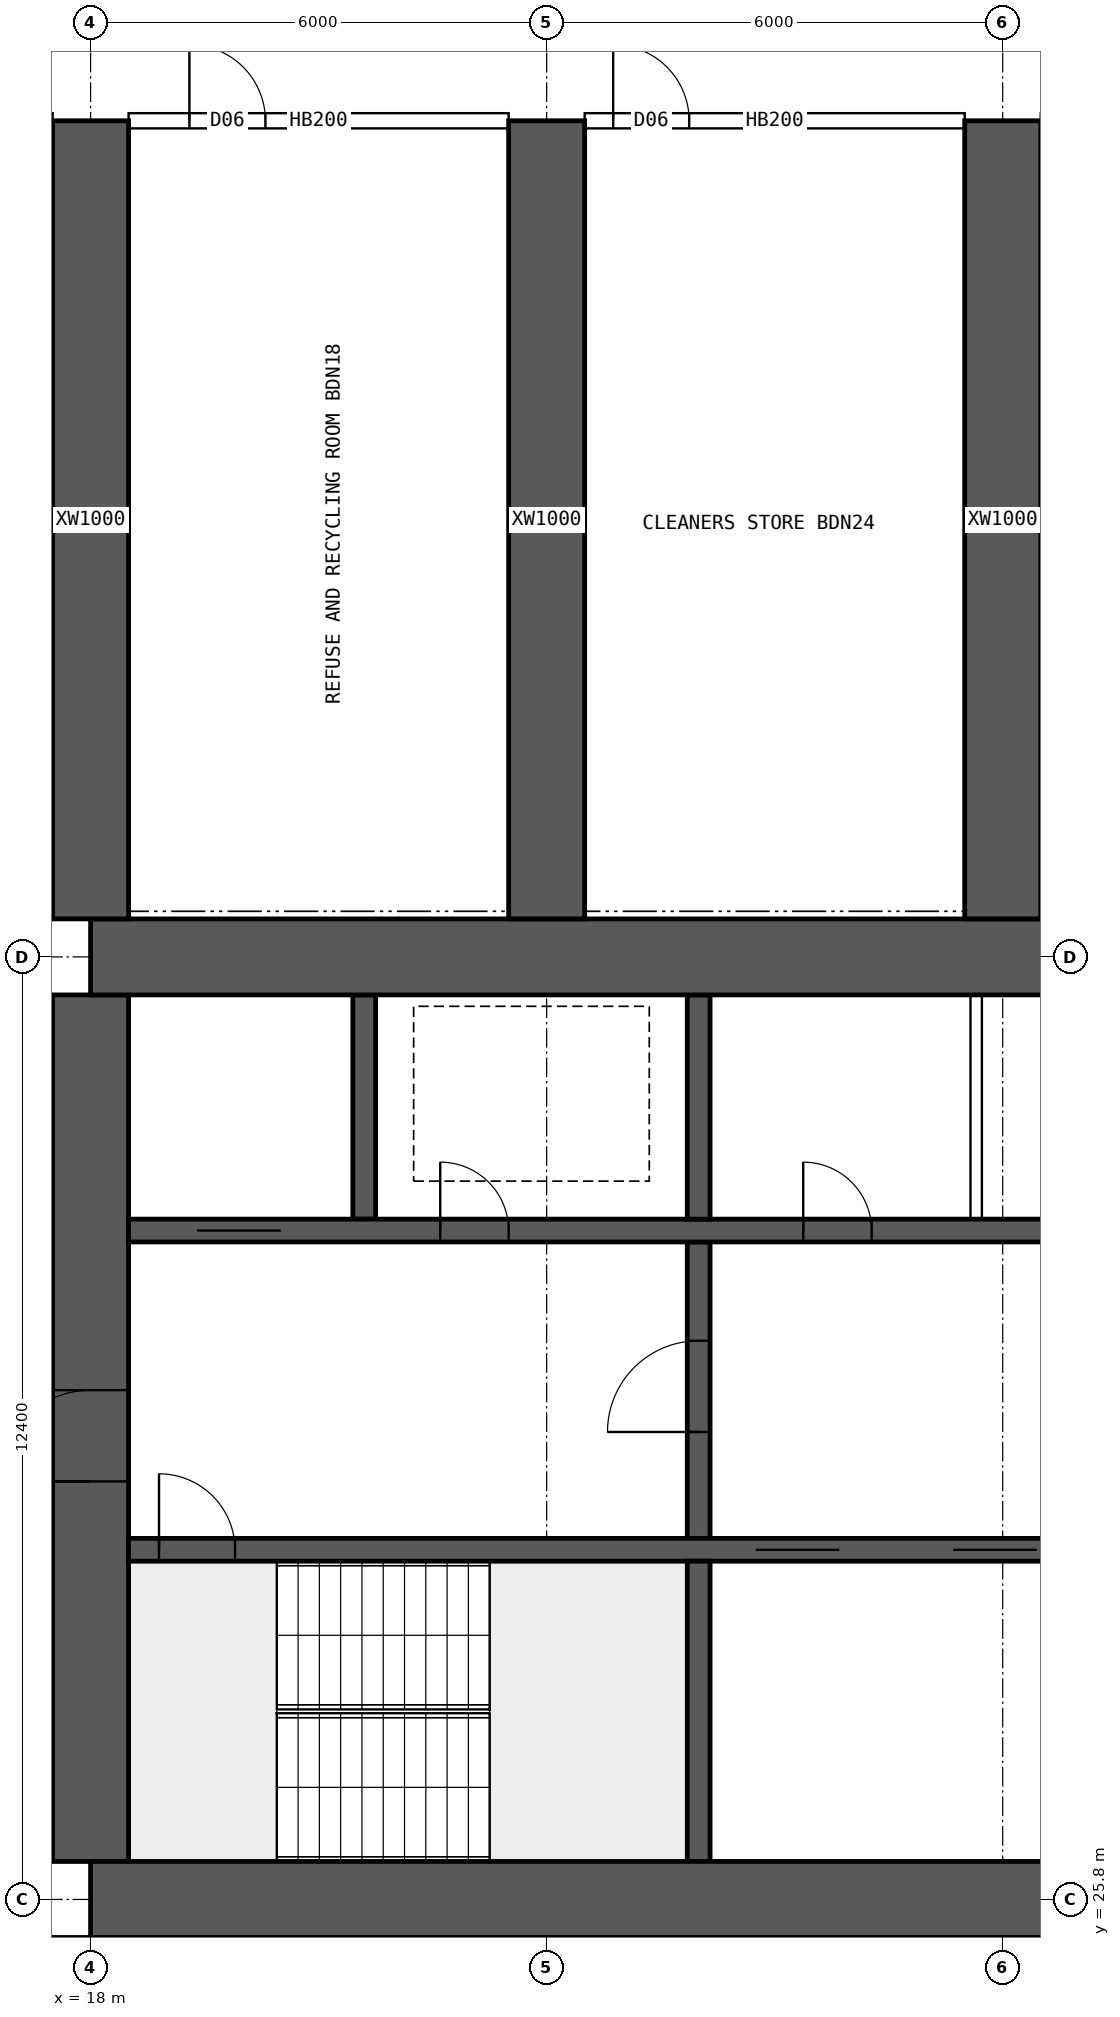
"""IFC4 building model, lengths in metres.
Left out: names, types, materials, properties, quantities, classifications, styles, units other than length and angle.
Written with IfcOpenShell. Run it as: python <this file> out.ifc"""

import sys

from ifc_helpers import new_model, si_unit, direction, frame, frame_2d, origin, place, context, subcontext, project, spatial, rectangle, extrude, element, fill, save


model = new_model("IFC4")
c1 = context("Model", 3, precision=1e-05, world=origin(), true_north=direction((0.0, 1.0)))
c2 = subcontext(c1, "Body", "Model", "MODEL_VIEW")
j1 = project(units=[si_unit("LENGTHUNIT", "METRE"), si_unit("PLANEANGLEUNIT", "RADIAN")], contexts=[c1])
p1 = place(None, origin())
s1 = spatial("IfcSite", under=j1, at=p1, CompositionType="ELEMENT")
p2 = place(p1, origin())
s2 = spatial("IfcBuilding", under=s1, at=p2, CompositionType="ELEMENT")
p3 = place(p2, frame((0.0, 0.0, 38.95)))
s3 = spatial("IfcBuildingStorey", under=s2, at=p3, CompositionType="ELEMENT", Elevation=38.95)
for number, where, z_axis, x_axis in (
    (1, (18.0, 25.8, 0.0), (0.0, 0.0, 1.0), (1.0, 0.0, 0.0)),
    (2, (18.0, 38.2, 0.0), (0.0, 0.0, 1.0), (1.0, 0.0, 0.0)),
):
    element("IfcWall", number, at=place(p3, frame(where, z_axis=z_axis, x_axis=x_axis)), inside=s3, PredefinedType="SHEAR", context=c2, shape_type="SweptSolid", body=[
        extrude(rectangle(XDim=48.0, YDim=1.0, at=frame_2d((24.0, 0.0))), origin(), (0.0, 0.0, 1.0), 3.75),
    ])
p4 = place(p3, frame((18.0, 26.3, 0.0), z_axis=(0.0, 0.0, 1.0), x_axis=(0.0, 1.0, 0.0)))
e3 = element("IfcWall", 3, at=p4, inside=s3, PredefinedType="SHEAR", context=c2, shape_type="SweptSolid", body=[
    extrude(rectangle(XDim=11.4, YDim=1.0, at=frame_2d((5.7, 0.0))), origin(), (0.0, 0.0, 1.0), 3.75),
])
p5 = place(p4, frame((5.0, 0.0, 0.0)))
e4 = element("IfcOpeningElement", 4, at=p5, cuts=e3, PredefinedType="OPENING", context=c2, shape_type="SweptSolid", body=[
    extrude(rectangle(XDim=1.2, YDim=2.1, at=frame_2d((0.6, 1.05))), frame((0.0, 0.51, 0.0), z_axis=(0.0, -1.0, 0.0), x_axis=(1.0, 0.0, 0.0)), (0.0, 0.0, 1.0), 1.02),
])
p6 = place(p3, frame((18.5, 30.4, 0.0), z_axis=(0.0, 0.0, 1.0), x_axis=(1.0, 0.0, 0.0)))
e5 = element("IfcWall", 5, at=p6, inside=s3, PredefinedType="SHEAR", context=c2, shape_type="SweptSolid", body=[
    extrude(rectangle(XDim=47.0, YDim=0.3, at=frame_2d((23.5, 0.0))), origin(), (0.0, 0.0, 1.0), 3.75),
])
p7 = place(p6, frame((0.4, 0.0, 0.0)))
e6 = element("IfcOpeningElement", 6, at=p7, cuts=e5, PredefinedType="OPENING", context=c2, shape_type="SweptSolid", body=[
    extrude(rectangle(XDim=1.0, YDim=2.1, at=frame_2d((0.5, 1.05))), frame((0.0, 0.16, 0.0), z_axis=(0.0, -1.0, 0.0), x_axis=(1.0, 0.0, 0.0)), (0.0, 0.0, 1.0), 0.32),
])
p8 = place(p6, frame((45.6, 0.0, 0.0)))
e7 = element("IfcOpeningElement", 7, at=p8, cuts=e5, PredefinedType="OPENING", context=c2, shape_type="SweptSolid", body=[
    extrude(rectangle(XDim=1.0, YDim=2.1, at=frame_2d((0.5, 1.05))), frame((0.0, 0.16, 0.0), z_axis=(0.0, -1.0, 0.0), x_axis=(1.0, 0.0, 0.0)), (0.0, 0.0, 1.0), 0.32),
])
p9 = place(p6, frame((8.25, 0.0, 0.0)))
e8 = element("IfcOpeningElement", 8, at=p9, cuts=e5, PredefinedType="OPENING", context=c2, shape_type="SweptSolid", body=[
    extrude(rectangle(XDim=1.1, YDim=2.1, at=frame_2d((0.55, 1.05))), frame((0.0, 0.16, 0.0), z_axis=(0.0, -1.0, 0.0), x_axis=(1.0, 0.0, 0.0)), (0.0, 0.0, 1.0), 0.32),
])
p10 = place(p6, frame((10.85, 0.0, 0.0)))
e9 = element("IfcOpeningElement", 9, at=p10, cuts=e5, PredefinedType="OPENING", context=c2, shape_type="SweptSolid", body=[
    extrude(rectangle(XDim=1.1, YDim=2.1, at=frame_2d((0.55, 1.05))), frame((0.0, 0.16, 0.0), z_axis=(0.0, -1.0, 0.0), x_axis=(1.0, 0.0, 0.0)), (0.0, 0.0, 1.0), 0.32),
])
p11 = place(p6, frame((13.45, 0.0, 0.0)))
e10 = element("IfcOpeningElement", 10, at=p11, cuts=e5, PredefinedType="OPENING", context=c2, shape_type="SweptSolid", body=[
    extrude(rectangle(XDim=1.1, YDim=2.1, at=frame_2d((0.55, 1.05))), frame((0.0, 0.16, 0.0), z_axis=(0.0, -1.0, 0.0), x_axis=(1.0, 0.0, 0.0)), (0.0, 0.0, 1.0), 0.32),
])
p12 = place(p6, frame((16.05, 0.0, 0.0)))
e11 = element("IfcOpeningElement", 11, at=p12, cuts=e5, PredefinedType="OPENING", context=c2, shape_type="SweptSolid", body=[
    extrude(rectangle(XDim=1.1, YDim=2.1, at=frame_2d((0.55, 1.05))), frame((0.0, 0.16, 0.0), z_axis=(0.0, -1.0, 0.0), x_axis=(1.0, 0.0, 0.0)), (0.0, 0.0, 1.0), 0.32),
])
p13 = place(p6, frame((30.117, 0.0, 0.0)))
e12 = element("IfcOpeningElement", 12, at=p13, cuts=e5, PredefinedType="OPENING", context=c2, shape_type="SweptSolid", body=[
    extrude(rectangle(XDim=1.1, YDim=2.1, at=frame_2d((0.55, 1.05))), frame((0.0, 0.16, 0.0), z_axis=(0.0, -1.0, 0.0), x_axis=(1.0, 0.0, 0.0)), (0.0, 0.0, 1.0), 0.32),
])
p14 = place(p6, frame((33.65, 0.0, 0.0)))
e13 = element("IfcOpeningElement", 13, at=p14, cuts=e5, PredefinedType="OPENING", context=c2, shape_type="SweptSolid", body=[
    extrude(rectangle(XDim=1.1, YDim=2.1, at=frame_2d((0.55, 1.05))), frame((0.0, 0.16, 0.0), z_axis=(0.0, -1.0, 0.0), x_axis=(1.0, 0.0, 0.0)), (0.0, 0.0, 1.0), 0.32),
])
p15 = place(p6, frame((37.183, 0.0, 0.0)))
e14 = element("IfcOpeningElement", 14, at=p15, cuts=e5, PredefinedType="OPENING", context=c2, shape_type="SweptSolid", body=[
    extrude(rectangle(XDim=1.1, YDim=2.1, at=frame_2d((0.55, 1.05))), frame((0.0, 0.16, 0.0), z_axis=(0.0, -1.0, 0.0), x_axis=(1.0, 0.0, 0.0)), (0.0, 0.0, 1.0), 0.32),
])
p16 = place(p3, frame((18.5, 34.6, 0.0), z_axis=(0.0, 0.0, 1.0), x_axis=(1.0, 0.0, 0.0)))
e15 = element("IfcWall", 15, at=p16, inside=s3, PredefinedType="SHEAR", context=c2, shape_type="SweptSolid", body=[
    extrude(rectangle(XDim=47.0, YDim=0.3, at=frame_2d((23.5, 0.0))), origin(), (0.0, 0.0, 1.0), 3.75),
])
p17 = place(p16, frame((0.9, 0.0, 0.0)))
e16 = element("IfcOpeningElement", 16, at=p17, cuts=e15, PredefinedType="OPENING", context=c2, shape_type="SweptSolid", body=[
    extrude(rectangle(XDim=1.1, YDim=2.1, at=frame_2d((0.55, 1.05))), frame((0.0, 0.16, 0.0), z_axis=(0.0, -1.0, 0.0), x_axis=(1.0, 0.0, 0.0)), (0.0, 0.0, 1.0), 0.32),
])
p18 = place(p16, frame((45.0, 0.0, 0.0)))
e17 = element("IfcOpeningElement", 17, at=p18, cuts=e15, PredefinedType="OPENING", context=c2, shape_type="SweptSolid", body=[
    extrude(rectangle(XDim=1.1, YDim=2.1, at=frame_2d((0.55, 1.05))), frame((0.0, 0.16, 0.0), z_axis=(0.0, -1.0, 0.0), x_axis=(1.0, 0.0, 0.0)), (0.0, 0.0, 1.0), 0.32),
])
p19 = place(p16, frame((4.1, 0.0, 0.0)))
e18 = element("IfcOpeningElement", 18, at=p19, cuts=e15, PredefinedType="OPENING", context=c2, shape_type="SweptSolid", body=[
    extrude(rectangle(XDim=0.9, YDim=2.1, at=frame_2d((0.45, 1.05))), frame((0.0, 0.16, 0.0), z_axis=(0.0, -1.0, 0.0), x_axis=(1.0, 0.0, 0.0)), (0.0, 0.0, 1.0), 0.32),
])
p20 = place(p16, frame((42.0, 0.0, 0.0)))
e19 = element("IfcOpeningElement", 19, at=p20, cuts=e15, PredefinedType="OPENING", context=c2, shape_type="SweptSolid", body=[
    extrude(rectangle(XDim=0.9, YDim=2.1, at=frame_2d((0.45, 1.05))), frame((0.0, 0.16, 0.0), z_axis=(0.0, -1.0, 0.0), x_axis=(1.0, 0.0, 0.0)), (0.0, 0.0, 1.0), 0.32),
])
p21 = place(p16, frame((8.875, 0.0, 0.0)))
e20 = element("IfcOpeningElement", 20, at=p21, cuts=e15, PredefinedType="OPENING", context=c2, shape_type="SweptSolid", body=[
    extrude(rectangle(XDim=0.9, YDim=2.1, at=frame_2d((0.45, 1.05))), frame((0.0, 0.16, 0.0), z_axis=(0.0, -1.0, 0.0), x_axis=(1.0, 0.0, 0.0)), (0.0, 0.0, 1.0), 0.32),
])
p22 = place(p16, frame((12.849, 0.0, 0.0)))
e21 = element("IfcOpeningElement", 21, at=p22, cuts=e15, PredefinedType="OPENING", context=c2, shape_type="SweptSolid", body=[
    extrude(rectangle(XDim=0.9, YDim=2.1, at=frame_2d((0.45, 1.05))), frame((0.0, 0.16, 0.0), z_axis=(0.0, -1.0, 0.0), x_axis=(1.0, 0.0, 0.0)), (0.0, 0.0, 1.0), 0.32),
])
p23 = place(p16, frame((16.496, 0.0, 0.0)))
e22 = element("IfcOpeningElement", 22, at=p23, cuts=e15, PredefinedType="OPENING", context=c2, shape_type="SweptSolid", body=[
    extrude(rectangle(XDim=0.9, YDim=2.1, at=frame_2d((0.45, 1.05))), frame((0.0, 0.16, 0.0), z_axis=(0.0, -1.0, 0.0), x_axis=(1.0, 0.0, 0.0)), (0.0, 0.0, 1.0), 0.32),
])
p24 = place(p16, frame((20.255, 0.0, 0.0)))
e23 = element("IfcOpeningElement", 23, at=p24, cuts=e15, PredefinedType="OPENING", context=c2, shape_type="SweptSolid", body=[
    extrude(rectangle(XDim=0.9, YDim=2.1, at=frame_2d((0.45, 1.05))), frame((0.0, 0.16, 0.0), z_axis=(0.0, -1.0, 0.0), x_axis=(1.0, 0.0, 0.0)), (0.0, 0.0, 1.0), 0.32),
])
p25 = place(p16, frame((24.661, 0.0, 0.0)))
e24 = element("IfcOpeningElement", 24, at=p25, cuts=e15, PredefinedType="OPENING", context=c2, shape_type="SweptSolid", body=[
    extrude(rectangle(XDim=0.9, YDim=2.1, at=frame_2d((0.45, 1.05))), frame((0.0, 0.16, 0.0), z_axis=(0.0, -1.0, 0.0), x_axis=(1.0, 0.0, 0.0)), (0.0, 0.0, 1.0), 0.32),
])
p26 = place(p16, frame((27.458, 0.0, 0.0)))
e25 = element("IfcOpeningElement", 25, at=p26, cuts=e15, PredefinedType="OPENING", context=c2, shape_type="SweptSolid", body=[
    extrude(rectangle(XDim=0.9, YDim=2.1, at=frame_2d((0.45, 1.05))), frame((0.0, 0.16, 0.0), z_axis=(0.0, -1.0, 0.0), x_axis=(1.0, 0.0, 0.0)), (0.0, 0.0, 1.0), 0.32),
])
p27 = place(p16, frame((33.579, 0.0, 0.0)))
e26 = element("IfcOpeningElement", 26, at=p27, cuts=e15, PredefinedType="OPENING", context=c2, shape_type="SweptSolid", body=[
    extrude(rectangle(XDim=0.9, YDim=2.1, at=frame_2d((0.45, 1.05))), frame((0.0, 0.16, 0.0), z_axis=(0.0, -1.0, 0.0), x_axis=(1.0, 0.0, 0.0)), (0.0, 0.0, 1.0), 0.32),
])
p28 = place(p3, frame((26.0, 26.3, 0.0), z_axis=(0.0, 0.0, 1.0), x_axis=(0.0, 1.0, 0.0)))
e27 = element("IfcWall", 27, at=p28, inside=s3, PredefinedType="SHEAR", context=c2, shape_type="SweptSolid", body=[
    extrude(rectangle(XDim=3.95, YDim=0.3, at=frame_2d((1.975, 0.0))), origin(), (0.0, 0.0, 1.0), 3.75),
])
p29 = place(p3, frame((26.0, 30.55, 0.0), z_axis=(0.0, 0.0, 1.0), x_axis=(0.0, 1.0, 0.0)))
e28 = element("IfcWall", 28, at=p29, inside=s3, PredefinedType="SHEAR", context=c2, shape_type="SweptSolid", body=[
    extrude(rectangle(XDim=3.9, YDim=0.3, at=frame_2d((1.95, 0.0))), origin(), (0.0, 0.0, 1.0), 3.75),
])
p30 = place(p29, frame((1.4, 0.0, 0.0)))
e29 = element("IfcOpeningElement", 29, at=p30, cuts=e28, PredefinedType="OPENING", context=c2, shape_type="SweptSolid", body=[
    extrude(rectangle(XDim=1.2, YDim=2.1, at=frame_2d((0.6, 1.05))), frame((0.0, 0.16, 0.0), z_axis=(0.0, -1.0, 0.0), x_axis=(1.0, 0.0, 0.0)), (0.0, 0.0, 1.0), 0.32),
])
for number, where, z_axis, x_axis in (
    (30, (21.6, 34.75, 0.0), (0.0, 0.0, 1.0), (0.0, 1.0, 0.0)),
    (31, (26.0, 34.75, 0.0), (0.0, 0.0, 1.0), (0.0, 1.0, 0.0)),
):
    element("IfcWall", number, at=place(p3, frame(where, z_axis=z_axis, x_axis=x_axis)), inside=s3, PredefinedType="SHEAR", context=c2, shape_type="SweptSolid", body=[
        extrude(rectangle(XDim=2.95, YDim=0.3, at=frame_2d((1.475, 0.0))), origin(), (0.0, 0.0, 1.0), 3.75),
    ])
for number, where, z_axis, x_axis in (
    (32, (18.0, 38.7, 0.0), (0.0, 0.0, 1.0), (0.0, 1.0, 0.0)),
    (33, (24.0, 38.7, 0.0), (0.0, 0.0, 1.0), (0.0, 1.0, 0.0)),
    (34, (30.0, 38.7, 0.0), (0.0, 0.0, 1.0), (0.0, 1.0, 0.0)),
):
    element("IfcWall", number, at=place(p3, frame(where, z_axis=z_axis, x_axis=x_axis)), inside=s3, PredefinedType="SHEAR", context=c2, shape_type="SweptSolid", body=[
        extrude(rectangle(XDim=10.5, YDim=1.0, at=frame_2d((5.25, 0.0))), origin(), (0.0, 0.0, 1.0), 3.75),
    ])
p31 = place(p3, frame((29.651, 34.75, 0.0), z_axis=(0.0, 0.0, 1.0), x_axis=(0.0, 1.0, 0.0)))
e35 = element("IfcWall", 35, at=p31, inside=s3, PredefinedType="SOLIDWALL", context=c2, shape_type="SweptSolid", body=[
    extrude(rectangle(XDim=2.95, YDim=0.15, at=frame_2d((1.475, 0.0))), origin(), (0.0, 0.0, 1.0), 3.5),
])
p32 = place(p3, frame((18.5, 49.2, 0.0), z_axis=(0.0, 0.0, 1.0), x_axis=(1.0, 0.0, 0.0)))
e36 = element("IfcWall", 36, at=p32, inside=s3, PredefinedType="SOLIDWALL", context=c2, shape_type="SweptSolid", body=[
    extrude(rectangle(XDim=5.0, YDim=0.2, at=frame_2d((2.5, 0.0))), origin(), (0.0, 0.0, 1.0), 3.5),
])
p33 = place(p32, frame((0.8, 0.0, 0.0)))
e37 = element("IfcOpeningElement", 37, at=p33, cuts=e36, PredefinedType="OPENING", context=c2, shape_type="SweptSolid", body=[
    extrude(rectangle(XDim=1.0, YDim=2.1, at=frame_2d((0.5, 1.05))), frame((0.0, 0.11, 0.0), z_axis=(0.0, -1.0, 0.0), x_axis=(1.0, 0.0, 0.0)), (0.0, 0.0, 1.0), 0.22),
])
p34 = place(p3, frame((24.5, 49.2, 0.0), z_axis=(0.0, 0.0, 1.0), x_axis=(1.0, 0.0, 0.0)))
e38 = element("IfcWall", 38, at=p34, inside=s3, PredefinedType="SOLIDWALL", context=c2, shape_type="SweptSolid", body=[
    extrude(rectangle(XDim=5.0, YDim=0.2, at=frame_2d((2.5, 0.0))), origin(), (0.0, 0.0, 1.0), 3.5),
])
p35 = place(p34, frame((0.375, 0.0, 0.0)))
e39 = element("IfcOpeningElement", 39, at=p35, cuts=e38, PredefinedType="OPENING", context=c2, shape_type="SweptSolid", body=[
    extrude(rectangle(XDim=1.0, YDim=2.1, at=frame_2d((0.5, 1.05))), frame((0.0, 0.11, 0.0), z_axis=(0.0, -1.0, 0.0), x_axis=(1.0, 0.0, 0.0)), (0.0, 0.0, 1.0), 0.22),
])
p36 = place(p3, frame((30.5, 49.2, 0.0), z_axis=(0.0, 0.0, 1.0), x_axis=(1.0, 0.0, 0.0)))
e40 = element("IfcWall", 40, at=p36, inside=s3, PredefinedType="SOLIDWALL", context=c2, shape_type="SweptSolid", body=[
    extrude(rectangle(XDim=5.0, YDim=0.2, at=frame_2d((2.5, 0.0))), origin(), (0.0, 0.0, 1.0), 3.5),
])
p37 = place(p36, frame((0.35, 0.0, 0.0)))
e41 = element("IfcOpeningElement", 41, at=p37, cuts=e40, PredefinedType="OPENING", context=c2, shape_type="SweptSolid", body=[
    extrude(rectangle(XDim=0.9, YDim=2.1, at=frame_2d((0.45, 1.05))), frame((0.0, 0.11, 0.0), z_axis=(0.0, -1.0, 0.0), x_axis=(1.0, 0.0, 0.0)), (0.0, 0.0, 1.0), 0.22),
])
p38 = place(p36, frame((3.88, 0.0, 0.0)))
e42 = element("IfcOpeningElement", 42, at=p38, cuts=e40, PredefinedType="OPENING", context=c2, shape_type="SweptSolid", body=[
    extrude(rectangle(XDim=0.9, YDim=2.1, at=frame_2d((0.45, 1.05))), frame((0.0, 0.11, 0.0), z_axis=(0.0, -1.0, 0.0), x_axis=(1.0, 0.0, 0.0)), (0.0, 0.0, 1.0), 0.22),
])
for number, where, z_axis, x_axis in (
    (43, (20.68, 14.9, 0.0), (0.0, 0.0, 1.0), (0.0, 1.0, 0.0)),
    (44, (27.075, 14.9, 0.0), (0.0, 0.0, 1.0), (0.0, 1.0, 0.0)),
):
    element("IfcWall", number, at=place(p3, frame(where, z_axis=z_axis, x_axis=x_axis)), inside=s3, PredefinedType="PARTITIONING", context=c2, shape_type="SweptSolid", body=[
        extrude(rectangle(XDim=10.4, YDim=0.15, at=frame_2d((5.2, 0.0))), origin(), (0.0, 0.0, 1.0), 3.5),
    ])
p39 = place(p5, origin())
e45 = element("IfcDoor", 45, at=p39, inside=s3, OperationType="SINGLE_SWING_LEFT", PredefinedType="DOOR", context=c2, shape_type="SweptSolid", body=[
    extrude(rectangle(XDim=1.2, YDim=2.1, at=frame_2d((0.6, 1.05))), frame((0.0, 0.025, 0.0), z_axis=(0.0, -1.0, 0.0), x_axis=(1.0, 0.0, 0.0)), (0.0, 0.0, 1.0), 0.05),
])
fill(e4, e45)
p40 = place(p7, origin())
e46 = element("IfcDoor", 46, at=p40, inside=s3, OperationType="SINGLE_SWING_LEFT", PredefinedType="DOOR", context=c2, shape_type="SweptSolid", body=[
    extrude(rectangle(XDim=1.0, YDim=2.1, at=frame_2d((0.5, 1.05))), frame((0.0, 0.025, 0.0), z_axis=(0.0, -1.0, 0.0), x_axis=(1.0, 0.0, 0.0)), (0.0, 0.0, 1.0), 0.05),
])
fill(e6, e46)
p41 = place(p17, origin())
e47 = element("IfcDoor", 47, at=p41, inside=s3, OperationType="DOUBLE_DOOR_SLIDING", PredefinedType="DOOR", context=c2, shape_type="SweptSolid", body=[
    extrude(rectangle(XDim=1.1, YDim=2.1, at=frame_2d((0.55, 1.05))), frame((0.0, 0.025, 0.0), z_axis=(0.0, -1.0, 0.0), x_axis=(1.0, 0.0, 0.0)), (0.0, 0.0, 1.0), 0.05),
])
fill(e16, e47)
p42 = place(p19, origin())
e48 = element("IfcDoor", 48, at=p42, inside=s3, OperationType="SINGLE_SWING_LEFT", PredefinedType="DOOR", context=c2, shape_type="SweptSolid", body=[
    extrude(rectangle(XDim=0.9, YDim=2.1, at=frame_2d((0.45, 1.05))), frame((0.0, 0.025, 0.0), z_axis=(0.0, -1.0, 0.0), x_axis=(1.0, 0.0, 0.0)), (0.0, 0.0, 1.0), 0.05),
])
fill(e18, e48)
p43 = place(p30, origin())
e49 = element("IfcDoor", 49, at=p43, inside=s3, OperationType="SINGLE_SWING_LEFT", PredefinedType="DOOR", context=c2, shape_type="SweptSolid", body=[
    extrude(rectangle(XDim=1.2, YDim=2.1, at=frame_2d((0.6, 1.05))), frame((0.0, 0.025, 0.0), z_axis=(0.0, -1.0, 0.0), x_axis=(1.0, 0.0, 0.0)), (0.0, 0.0, 1.0), 0.05),
])
fill(e29, e49)
p44 = place(p21, origin())
e50 = element("IfcDoor", 50, at=p44, inside=s3, OperationType="SINGLE_SWING_LEFT", PredefinedType="DOOR", context=c2, shape_type="SweptSolid", body=[
    extrude(rectangle(XDim=0.9, YDim=2.1, at=frame_2d((0.45, 1.05))), frame((0.0, 0.025, 0.0), z_axis=(0.0, -1.0, 0.0), x_axis=(1.0, 0.0, 0.0)), (0.0, 0.0, 1.0), 0.05),
])
fill(e20, e50)
p45 = place(p9, origin())
e51 = element("IfcDoor", 51, at=p45, inside=s3, OperationType="DOUBLE_DOOR_SLIDING", PredefinedType="DOOR", context=c2, shape_type="SweptSolid", body=[
    extrude(rectangle(XDim=1.1, YDim=2.1, at=frame_2d((0.55, 1.05))), frame((0.0, 0.025, 0.0), z_axis=(0.0, -1.0, 0.0), x_axis=(1.0, 0.0, 0.0)), (0.0, 0.0, 1.0), 0.05),
])
fill(e8, e51)
p46 = place(p10, origin())
e52 = element("IfcDoor", 52, at=p46, inside=s3, OperationType="DOUBLE_DOOR_SLIDING", PredefinedType="DOOR", context=c2, shape_type="SweptSolid", body=[
    extrude(rectangle(XDim=1.1, YDim=2.1, at=frame_2d((0.55, 1.05))), frame((0.0, 0.025, 0.0), z_axis=(0.0, -1.0, 0.0), x_axis=(1.0, 0.0, 0.0)), (0.0, 0.0, 1.0), 0.05),
])
fill(e9, e52)
p47 = place(p33, origin())
e53 = element("IfcDoor", 53, at=p47, inside=s3, OperationType="SINGLE_SWING_LEFT", PredefinedType="DOOR", context=c2, shape_type="SweptSolid", body=[
    extrude(rectangle(XDim=1.0, YDim=2.1, at=frame_2d((0.5, 1.05))), frame((0.0, 0.025, 0.0), z_axis=(0.0, -1.0, 0.0), x_axis=(1.0, 0.0, 0.0)), (0.0, 0.0, 1.0), 0.05),
])
fill(e37, e53)
p48 = place(p35, origin())
e54 = element("IfcDoor", 54, at=p48, inside=s3, OperationType="SINGLE_SWING_LEFT", PredefinedType="DOOR", context=c2, shape_type="SweptSolid", body=[
    extrude(rectangle(XDim=1.0, YDim=2.1, at=frame_2d((0.5, 1.05))), frame((0.0, 0.025, 0.0), z_axis=(0.0, -1.0, 0.0), x_axis=(1.0, 0.0, 0.0)), (0.0, 0.0, 1.0), 0.05),
])
fill(e39, e54)
save(model, sys.argv[1])
